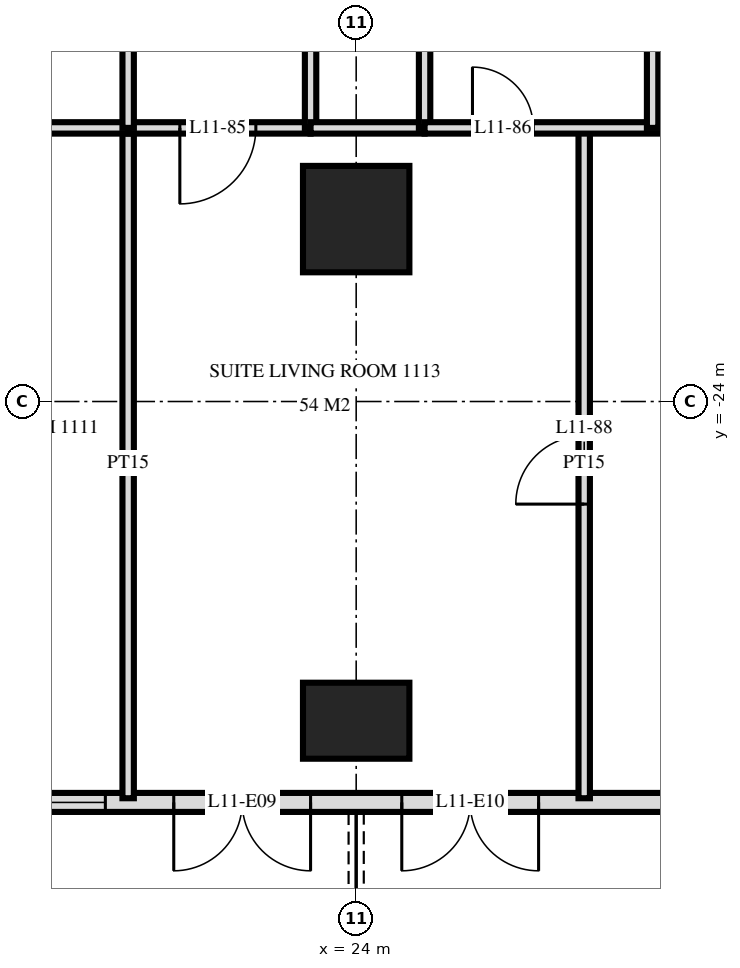
"""IFC4 building model, lengths in metres.
Left out: names, types, materials, properties, quantities, classifications, styles, units other than length and angle.
Written with IfcOpenShell. Run it as: python <this file> out.ifc"""

import sys

from ifc_helpers import new_model, si_unit, direction, frame, frame_2d, origin, origin_2d, place, context, subcontext, project, spatial, rectangle, extrude, element, fill, save


model = new_model("IFC4")
c1 = context("Model", 3, precision=1e-05, world=origin(), true_north=direction((0.0, 1.0)))
c2 = subcontext(c1, "Body", "Model", "MODEL_VIEW")
j1 = project(units=[si_unit("LENGTHUNIT", "METRE"), si_unit("PLANEANGLEUNIT", "RADIAN")], contexts=[c1])
p1 = place(None, origin())
s1 = spatial("IfcSite", under=j1, at=p1, CompositionType="ELEMENT")
p2 = place(p1, origin())
s2 = spatial("IfcBuilding", under=s1, at=p2, CompositionType="ELEMENT")
p3 = place(p2, frame((0.0, 0.0, 49.2)))
s3 = spatial("IfcBuildingStorey", under=s2, at=p3, CompositionType="ELEMENT", Elevation=49.2)
p4 = place(p3, frame((24.0, -28.2, 0.0), z_axis=(0.0, 0.0, 1.0), x_axis=(1.0, 0.0, 0.0)))
e1 = element("IfcColumn", 1, at=p4, inside=s3, PredefinedType="COLUMN", context=c2, shape_type="SweptSolid", body=[
    extrude(rectangle(XDim=1.4, YDim=1.0, at=origin_2d()), origin(), (0.0, 0.0, 1.0), 3.6),
])
p5 = place(p3, frame((24.0, -21.6, 0.0), z_axis=(0.0, 0.0, 1.0), x_axis=(1.0, 0.0, 0.0)))
e2 = element("IfcColumn", 2, at=p5, inside=s3, PredefinedType="COLUMN", context=c2, shape_type="SweptSolid", body=[
    extrude(rectangle(XDim=1.4, YDim=1.4, at=origin_2d()), origin(), (0.0, 0.0, 1.0), 3.6),
])
p6 = place(p3, frame((-28.775, -29.275, 0.0), z_axis=(0.0, 0.0, 1.0), x_axis=(1.0, 0.0, 0.0)))
e3 = element("IfcWall", 3, at=p6, inside=s3, PredefinedType="SOLIDWALL", context=c2, shape_type="SweptSolid", body=[
    extrude(rectangle(XDim=57.551, YDim=0.25, at=frame_2d((28.775, 0.0))), origin(), (0.0, 0.0, 1.0), 3.32),
])
p7 = place(p6, frame((0.575, 0.0, 0.0)))
e4 = element("IfcOpeningElement", 4, at=p7, cuts=e3, PredefinedType="OPENING", context=c2, shape_type="SweptSolid", body=[
    extrude(rectangle(XDim=1.8, YDim=2.4, at=frame_2d((0.9, 1.2))), frame((0.0, 0.135, 0.0), z_axis=(0.0, -1.0, 0.0), x_axis=(1.0, 0.0, 0.0)), (0.0, 0.0, 1.0), 0.27),
])
p8 = place(p6, frame((5.375, 0.0, 0.0)))
e5 = element("IfcOpeningElement", 5, at=p8, cuts=e3, PredefinedType="OPENING", context=c2, shape_type="SweptSolid", body=[
    extrude(rectangle(XDim=1.8, YDim=2.4, at=frame_2d((0.9, 1.2))), frame((0.0, 0.135, 0.0), z_axis=(0.0, -1.0, 0.0), x_axis=(1.0, 0.0, 0.0)), (0.0, 0.0, 1.0), 0.27),
])
p9 = place(p6, frame((8.075, 0.0, 0.3)))
e6 = element("IfcOpeningElement", 6, at=p9, cuts=e3, PredefinedType="OPENING", context=c2, shape_type="SweptSolid", body=[
    extrude(rectangle(XDim=2.4, YDim=2.1, at=frame_2d((1.2, 1.05))), frame((0.0, 0.135, 0.0), z_axis=(0.0, -1.0, 0.0), x_axis=(1.0, 0.0, 0.0)), (0.0, 0.0, 1.0), 0.27),
])
p10 = place(p6, frame((11.375, 0.0, 0.0)))
e7 = element("IfcOpeningElement", 7, at=p10, cuts=e3, PredefinedType="OPENING", context=c2, shape_type="SweptSolid", body=[
    extrude(rectangle(XDim=1.8, YDim=2.4, at=frame_2d((0.9, 1.2))), frame((0.0, 0.135, 0.0), z_axis=(0.0, -1.0, 0.0), x_axis=(1.0, 0.0, 0.0)), (0.0, 0.0, 1.0), 0.27),
])
p11 = place(p6, frame((14.075, 0.0, 0.3)))
e8 = element("IfcOpeningElement", 8, at=p11, cuts=e3, PredefinedType="OPENING", context=c2, shape_type="SweptSolid", body=[
    extrude(rectangle(XDim=2.4, YDim=2.1, at=frame_2d((1.2, 1.05))), frame((0.0, 0.135, 0.0), z_axis=(0.0, -1.0, 0.0), x_axis=(1.0, 0.0, 0.0)), (0.0, 0.0, 1.0), 0.27),
])
p12 = place(p6, frame((17.375, 0.0, 0.0)))
e9 = element("IfcOpeningElement", 9, at=p12, cuts=e3, PredefinedType="OPENING", context=c2, shape_type="SweptSolid", body=[
    extrude(rectangle(XDim=1.8, YDim=2.4, at=frame_2d((0.9, 1.2))), frame((0.0, 0.135, 0.0), z_axis=(0.0, -1.0, 0.0), x_axis=(1.0, 0.0, 0.0)), (0.0, 0.0, 1.0), 0.27),
])
p13 = place(p6, frame((20.075, 0.0, 0.3)))
e10 = element("IfcOpeningElement", 10, at=p13, cuts=e3, PredefinedType="OPENING", context=c2, shape_type="SweptSolid", body=[
    extrude(rectangle(XDim=2.4, YDim=2.1, at=frame_2d((1.2, 1.05))), frame((0.0, 0.135, 0.0), z_axis=(0.0, -1.0, 0.0), x_axis=(1.0, 0.0, 0.0)), (0.0, 0.0, 1.0), 0.27),
])
p14 = place(p6, frame((23.075, 0.0, 0.3)))
e11 = element("IfcOpeningElement", 11, at=p14, cuts=e3, PredefinedType="OPENING", context=c2, shape_type="SweptSolid", body=[
    extrude(rectangle(XDim=2.4, YDim=2.1, at=frame_2d((1.2, 1.05))), frame((0.0, 0.135, 0.0), z_axis=(0.0, -1.0, 0.0), x_axis=(1.0, 0.0, 0.0)), (0.0, 0.0, 1.0), 0.27),
])
p15 = place(p6, frame((26.375, 0.0, 0.0)))
e12 = element("IfcOpeningElement", 12, at=p15, cuts=e3, PredefinedType="OPENING", context=c2, shape_type="SweptSolid", body=[
    extrude(rectangle(XDim=1.8, YDim=2.4, at=frame_2d((0.9, 1.2))), frame((0.0, 0.135, 0.0), z_axis=(0.0, -1.0, 0.0), x_axis=(1.0, 0.0, 0.0)), (0.0, 0.0, 1.0), 0.27),
])
p16 = place(p6, frame((29.375, 0.0, 0.0)))
e13 = element("IfcOpeningElement", 13, at=p16, cuts=e3, PredefinedType="OPENING", context=c2, shape_type="SweptSolid", body=[
    extrude(rectangle(XDim=1.8, YDim=2.4, at=frame_2d((0.9, 1.2))), frame((0.0, 0.135, 0.0), z_axis=(0.0, -1.0, 0.0), x_axis=(1.0, 0.0, 0.0)), (0.0, 0.0, 1.0), 0.27),
])
p17 = place(p6, frame((32.075, 0.0, 0.3)))
e14 = element("IfcOpeningElement", 14, at=p17, cuts=e3, PredefinedType="OPENING", context=c2, shape_type="SweptSolid", body=[
    extrude(rectangle(XDim=2.4, YDim=2.1, at=frame_2d((1.2, 1.05))), frame((0.0, 0.135, 0.0), z_axis=(0.0, -1.0, 0.0), x_axis=(1.0, 0.0, 0.0)), (0.0, 0.0, 1.0), 0.27),
])
p18 = place(p6, frame((35.075, 0.0, 0.3)))
e15 = element("IfcOpeningElement", 15, at=p18, cuts=e3, PredefinedType="OPENING", context=c2, shape_type="SweptSolid", body=[
    extrude(rectangle(XDim=2.4, YDim=2.1, at=frame_2d((1.2, 1.05))), frame((0.0, 0.135, 0.0), z_axis=(0.0, -1.0, 0.0), x_axis=(1.0, 0.0, 0.0)), (0.0, 0.0, 1.0), 0.27),
])
p19 = place(p6, frame((38.375, 0.0, 0.0)))
e16 = element("IfcOpeningElement", 16, at=p19, cuts=e3, PredefinedType="OPENING", context=c2, shape_type="SweptSolid", body=[
    extrude(rectangle(XDim=1.8, YDim=2.4, at=frame_2d((0.9, 1.2))), frame((0.0, 0.135, 0.0), z_axis=(0.0, -1.0, 0.0), x_axis=(1.0, 0.0, 0.0)), (0.0, 0.0, 1.0), 0.27),
])
p20 = place(p6, frame((41.375, 0.0, 0.0)))
e17 = element("IfcOpeningElement", 17, at=p20, cuts=e3, PredefinedType="OPENING", context=c2, shape_type="SweptSolid", body=[
    extrude(rectangle(XDim=1.8, YDim=2.4, at=frame_2d((0.9, 1.2))), frame((0.0, 0.135, 0.0), z_axis=(0.0, -1.0, 0.0), x_axis=(1.0, 0.0, 0.0)), (0.0, 0.0, 1.0), 0.27),
])
p21 = place(p6, frame((44.075, 0.0, 0.3)))
e18 = element("IfcOpeningElement", 18, at=p21, cuts=e3, PredefinedType="OPENING", context=c2, shape_type="SweptSolid", body=[
    extrude(rectangle(XDim=2.4, YDim=2.1, at=frame_2d((1.2, 1.05))), frame((0.0, 0.135, 0.0), z_axis=(0.0, -1.0, 0.0), x_axis=(1.0, 0.0, 0.0)), (0.0, 0.0, 1.0), 0.27),
])
p22 = place(p6, frame((47.075, 0.0, 0.3)))
e19 = element("IfcOpeningElement", 19, at=p22, cuts=e3, PredefinedType="OPENING", context=c2, shape_type="SweptSolid", body=[
    extrude(rectangle(XDim=2.4, YDim=2.1, at=frame_2d((1.2, 1.05))), frame((0.0, 0.135, 0.0), z_axis=(0.0, -1.0, 0.0), x_axis=(1.0, 0.0, 0.0)), (0.0, 0.0, 1.0), 0.27),
])
p23 = place(p6, frame((50.375, 0.0, 0.0)))
e20 = element("IfcOpeningElement", 20, at=p23, cuts=e3, PredefinedType="OPENING", context=c2, shape_type="SweptSolid", body=[
    extrude(rectangle(XDim=1.8, YDim=2.4, at=frame_2d((0.9, 1.2))), frame((0.0, 0.135, 0.0), z_axis=(0.0, -1.0, 0.0), x_axis=(1.0, 0.0, 0.0)), (0.0, 0.0, 1.0), 0.27),
])
p24 = place(p6, frame((53.375, 0.0, 0.0)))
e21 = element("IfcOpeningElement", 21, at=p24, cuts=e3, PredefinedType="OPENING", context=c2, shape_type="SweptSolid", body=[
    extrude(rectangle(XDim=1.8, YDim=2.4, at=frame_2d((0.9, 1.2))), frame((0.0, 0.135, 0.0), z_axis=(0.0, -1.0, 0.0), x_axis=(1.0, 0.0, 0.0)), (0.0, 0.0, 1.0), 0.27),
])
p25 = place(p3, frame((27.9, -20.4, 0.0), z_axis=(0.0, 0.0, 1.0), x_axis=(0.0, 1.0, 0.0)))
e22 = element("IfcWall", 22, at=p25, inside=s3, PredefinedType="PARTITIONING", context=c2, shape_type="SweptSolid", body=[
    extrude(rectangle(XDim=3.0, YDim=0.15, at=frame_2d((1.5, 0.0))), origin(), (0.0, 0.0, 1.0), 3.32),
])
p26 = place(p3, frame((27.0, -29.22, 0.0), z_axis=(0.0, 0.0, 1.0), x_axis=(0.0, 1.0, 0.0)))
e23 = element("IfcWall", 23, at=p26, inside=s3, PredefinedType="PARTITIONING", context=c2, shape_type="SweptSolid", body=[
    extrude(rectangle(XDim=8.82, YDim=0.15, at=frame_2d((4.41, 0.0))), origin(), (0.0, 0.0, 1.0), 3.32),
])
p27 = place(p26, frame((3.87, 0.0, 0.0)))
e24 = element("IfcOpeningElement", 24, at=p27, cuts=e23, PredefinedType="OPENING", context=c2, shape_type="SweptSolid", body=[
    extrude(rectangle(XDim=0.9, YDim=2.1, at=frame_2d((0.45, 1.05))), frame((0.0, 0.085, 0.0), z_axis=(0.0, -1.0, 0.0), x_axis=(1.0, 0.0, 0.0)), (0.0, 0.0, 1.0), 0.17),
])
p28 = place(p3, frame((24.9, -20.4, 0.0), z_axis=(0.0, 0.0, 1.0), x_axis=(0.0, 1.0, 0.0)))
e25 = element("IfcWall", 25, at=p28, inside=s3, PredefinedType="PLUMBINGWALL", context=c2, shape_type="SweptSolid", body=[
    extrude(rectangle(XDim=3.0, YDim=0.15, at=frame_2d((1.5, 0.0))), origin(), (0.0, 0.0, 1.0), 3.32),
])
p29 = place(p3, frame((23.4, -20.4, 0.0), z_axis=(0.0, 0.0, 1.0), x_axis=(0.0, 1.0, 0.0)))
e26 = element("IfcWall", 26, at=p29, inside=s3, PredefinedType="PARTITIONING", context=c2, shape_type="SweptSolid", body=[
    extrude(rectangle(XDim=3.0, YDim=0.15, at=frame_2d((1.5, 0.0))), origin(), (0.0, 0.0, 1.0), 3.32),
])
p30 = place(p29, frame((1.02, 0.0, 0.0)))
e27 = element("IfcOpeningElement", 27, at=p30, cuts=e26, PredefinedType="OPENING", context=c2, shape_type="SweptSolid", body=[
    extrude(rectangle(XDim=1.0, YDim=2.1, at=frame_2d((0.5, 1.05))), frame((0.0, 0.085, 0.0), z_axis=(0.0, -1.0, 0.0), x_axis=(1.0, 0.0, 0.0)), (0.0, 0.0, 1.0), 0.17),
])
p31 = place(p3, frame((21.0, -20.4, 0.0), z_axis=(0.0, 0.0, 1.0), x_axis=(0.0, 1.0, 0.0)))
e28 = element("IfcWall", 28, at=p31, inside=s3, PredefinedType="PARTITIONING", context=c2, shape_type="SweptSolid", body=[
    extrude(rectangle(XDim=3.0, YDim=0.15, at=frame_2d((1.5, 0.0))), origin(), (0.0, 0.0, 1.0), 3.32),
])
p32 = place(p3, frame((21.0, -29.22, 0.0), z_axis=(0.0, 0.0, 1.0), x_axis=(0.0, 1.0, 0.0)))
e29 = element("IfcWall", 29, at=p32, inside=s3, PredefinedType="PARTITIONING", context=c2, shape_type="SweptSolid", body=[
    extrude(rectangle(XDim=8.82, YDim=0.15, at=frame_2d((4.41, 0.0))), origin(), (0.0, 0.0, 1.0), 3.32),
])
p33 = place(p3, frame((21.0, -20.4, 0.0), z_axis=(0.0, 0.0, 1.0), x_axis=(1.0, 0.0, 0.0)))
e30 = element("IfcWall", 30, at=p33, inside=s3, PredefinedType="PARTITIONING", context=c2, shape_type="SweptSolid", body=[
    extrude(rectangle(XDim=2.4, YDim=0.15, at=frame_2d((1.2, 0.0))), origin(), (0.0, 0.0, 1.0), 3.32),
])
p34 = place(p33, frame((0.68, 0.0, 0.0)))
e31 = element("IfcOpeningElement", 31, at=p34, cuts=e30, PredefinedType="OPENING", context=c2, shape_type="SweptSolid", body=[
    extrude(rectangle(XDim=1.0, YDim=2.1, at=frame_2d((0.5, 1.05))), frame((0.0, 0.085, 0.0), z_axis=(0.0, -1.0, 0.0), x_axis=(1.0, 0.0, 0.0)), (0.0, 0.0, 1.0), 0.17),
])
p35 = place(p3, frame((19.3, -20.4, 0.0), z_axis=(0.0, 0.0, 1.0), x_axis=(1.0, 0.0, 0.0)))
e32 = element("IfcWall", 32, at=p35, inside=s3, PredefinedType="PARTITIONING", context=c2, shape_type="SweptSolid", body=[
    extrude(rectangle(XDim=1.7, YDim=0.15, at=frame_2d((0.85, 0.0))), origin(), (0.0, 0.0, 1.0), 3.32),
])
p36 = place(p3, frame((24.9, -20.4, 0.0), z_axis=(0.0, 0.0, 1.0), x_axis=(1.0, 0.0, 0.0)))
e33 = element("IfcWall", 33, at=p36, inside=s3, PredefinedType="PARTITIONING", context=c2, shape_type="SweptSolid", body=[
    extrude(rectangle(XDim=8.22, YDim=0.15, at=frame_2d((4.11, 0.0))), origin(), (0.0, 0.0, 1.0), 3.32),
])
p37 = place(p36, frame((0.63, 0.0, 0.0)))
e34 = element("IfcOpeningElement", 34, at=p37, cuts=e33, PredefinedType="OPENING", context=c2, shape_type="SweptSolid", body=[
    extrude(rectangle(XDim=0.8, YDim=2.1, at=frame_2d((0.4, 1.05))), frame((0.0, 0.085, 0.0), z_axis=(0.0, -1.0, 0.0), x_axis=(1.0, 0.0, 0.0)), (0.0, 0.0, 1.0), 0.17),
])
p38 = place(p36, frame((3.48, 0.0, 0.0)))
e35 = element("IfcOpeningElement", 35, at=p38, cuts=e33, PredefinedType="OPENING", context=c2, shape_type="SweptSolid", body=[
    extrude(rectangle(XDim=0.9, YDim=2.1, at=frame_2d((0.45, 1.05))), frame((0.0, 0.085, 0.0), z_axis=(0.0, -1.0, 0.0), x_axis=(1.0, 0.0, 0.0)), (0.0, 0.0, 1.0), 0.17),
])
p39 = place(p3, frame((23.4, -20.4, 0.0), z_axis=(0.0, 0.0, 1.0), x_axis=(1.0, 0.0, 0.0)))
e36 = element("IfcWall", 36, at=p39, inside=s3, PredefinedType="PLUMBINGWALL", context=c2, shape_type="SweptSolid", body=[
    extrude(rectangle(XDim=1.5, YDim=0.15, at=frame_2d((0.75, 0.0))), origin(), (0.0, 0.0, 1.0), 3.32),
])
p40 = place(p22, origin())
e37 = element("IfcWindow", 37, at=p40, inside=s3, PartitioningType="SINGLE_PANEL", PredefinedType="WINDOW", context=c2, shape_type="SweptSolid", body=[
    extrude(rectangle(XDim=2.4, YDim=2.1, at=frame_2d((1.2, 1.05))), frame((0.0, 0.03, 0.0), z_axis=(0.0, -1.0, 0.0), x_axis=(1.0, 0.0, 0.0)), (0.0, 0.0, 1.0), 0.06),
])
fill(e19, e37)
p41 = place(p23, frame((0.9, 0.0, 0.0), z_axis=(0.0, 0.0, 1.0), x_axis=(-1.0, 0.0, 0.0)))
e38 = element("IfcDoor", 38, at=p41, inside=s3, OperationType="DOUBLE_DOOR_SINGLE_SWING", PredefinedType="DOOR", context=c2, shape_type="SweptSolid", body=[
    extrude(rectangle(XDim=1.8, YDim=2.4, at=frame_2d((0.0, 1.2))), frame((0.0, -0.025, 0.0), z_axis=(0.0, 1.0, 0.0), x_axis=(-1.0, 0.0, 0.0)), (0.0, 0.0, 1.0), 0.05),
])
fill(e20, e38)
p42 = place(p24, frame((0.9, 0.0, 0.0), z_axis=(0.0, 0.0, 1.0), x_axis=(-1.0, 0.0, 0.0)))
e39 = element("IfcDoor", 39, at=p42, inside=s3, OperationType="DOUBLE_DOOR_SINGLE_SWING", PredefinedType="DOOR", context=c2, shape_type="SweptSolid", body=[
    extrude(rectangle(XDim=1.8, YDim=2.4, at=frame_2d((0.0, 1.2))), frame((0.0, -0.025, 0.0), z_axis=(0.0, 1.0, 0.0), x_axis=(-1.0, 0.0, 0.0)), (0.0, 0.0, 1.0), 0.05),
])
fill(e21, e39)
p43 = place(p34, frame((0.5, 0.0, 0.0), z_axis=(0.0, 0.0, 1.0), x_axis=(-1.0, 0.0, 0.0)))
e40 = element("IfcDoor", 40, at=p43, inside=s3, OperationType="SINGLE_SWING_LEFT", PredefinedType="DOOR", context=c2, shape_type="SweptSolid", body=[
    extrude(rectangle(XDim=1.0, YDim=2.1, at=frame_2d((0.0, 1.05))), frame((0.0, -0.025, 0.0), z_axis=(0.0, 1.0, 0.0), x_axis=(-1.0, 0.0, 0.0)), (0.0, 0.0, 1.0), 0.05),
])
fill(e31, e40)
p44 = place(p37, origin())
e41 = element("IfcDoor", 41, at=p44, inside=s3, OperationType="SINGLE_SWING_RIGHT", PredefinedType="DOOR", context=c2, shape_type="SweptSolid", body=[
    extrude(rectangle(XDim=0.8, YDim=2.1, at=frame_2d((0.4, 1.05))), frame((0.0, 0.025, 0.0), z_axis=(0.0, -1.0, 0.0), x_axis=(1.0, 0.0, 0.0)), (0.0, 0.0, 1.0), 0.05),
])
fill(e34, e41)
p45 = place(p27, origin())
e42 = element("IfcDoor", 42, at=p45, inside=s3, OperationType="SINGLE_SWING_RIGHT", PredefinedType="DOOR", context=c2, shape_type="SweptSolid", body=[
    extrude(rectangle(XDim=0.9, YDim=2.1, at=frame_2d((0.45, 1.05))), frame((0.0, 0.025, 0.0), z_axis=(0.0, -1.0, 0.0), x_axis=(1.0, 0.0, 0.0)), (0.0, 0.0, 1.0), 0.05),
])
fill(e24, e42)
save(model, sys.argv[1])
